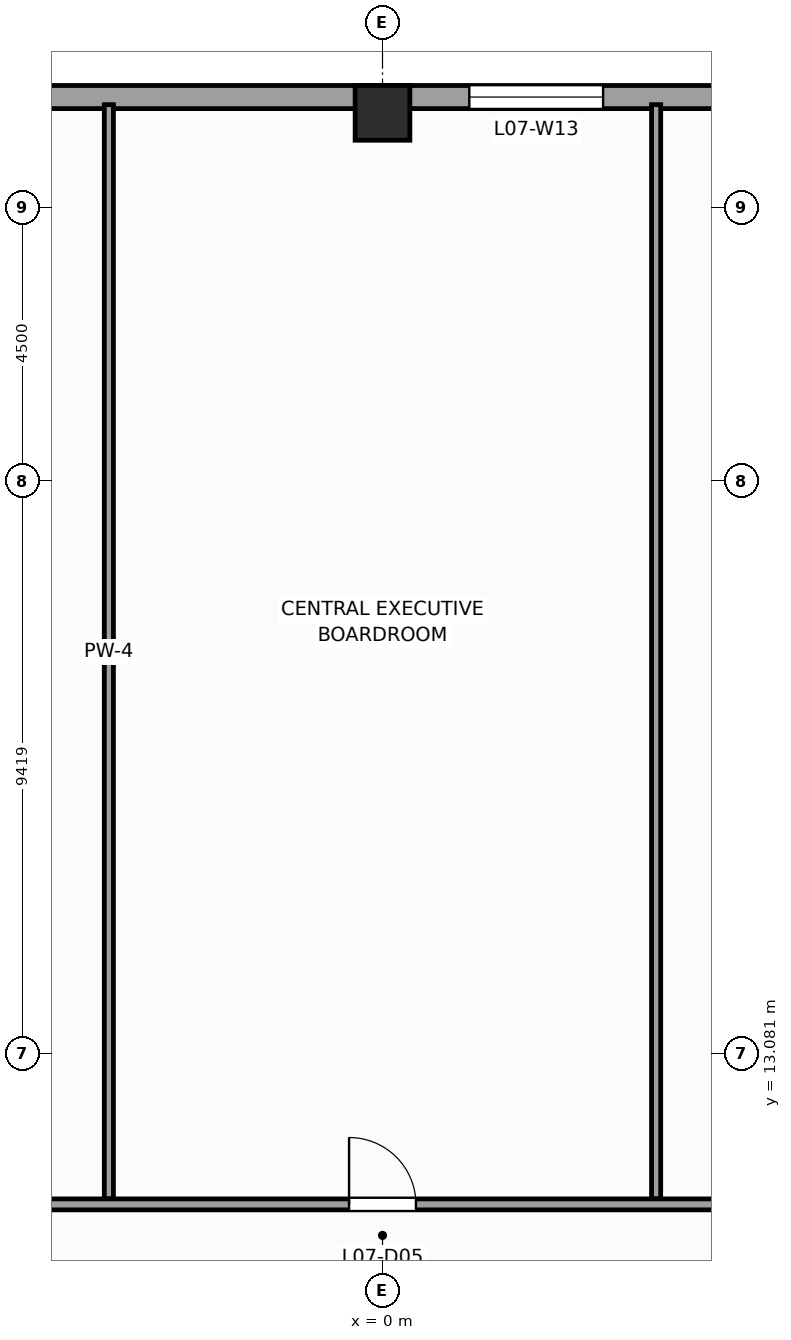
"""IFC4 building model, lengths in metres.
Left out: names, types, materials, properties, quantities, classifications, styles, units other than length and angle.
Written with IfcOpenShell. Run it as: python <this file> out.ifc"""

import sys

from ifc_helpers import new_model, si_unit, direction, frame, frame_2d, origin, origin_2d, place, context, subcontext, project, spatial, rectangle, extrude, source, transform, mapped, element, fill, save


model = new_model("IFC4")
c1 = context("Model", 3, precision=1e-05, world=origin(), true_north=direction((0.0, 1.0)))
c2 = subcontext(c1, "Body", "Model", "MODEL_VIEW")
j1 = project(units=[si_unit("LENGTHUNIT", "METRE"), si_unit("PLANEANGLEUNIT", "RADIAN")], contexts=[c1])
p1 = place(None, origin())
s1 = spatial("IfcSite", under=j1, at=p1, CompositionType="ELEMENT")
p2 = place(p1, origin())
s2 = spatial("IfcBuilding", under=s1, at=p2, CompositionType="ELEMENT")
p3 = place(p2, frame((0.0, 0.0, 34.0)))
s3 = spatial("IfcBuildingStorey", under=s2, at=p3, CompositionType="ELEMENT", Elevation=34.0)
m1 = source(origin(), c2, "Body", "SweptSolid", [
    extrude(rectangle(XDim=0.9, YDim=0.9, at=origin_2d()), origin(), (0.0, 0.0, 1.0), 4.0),
])
p4 = place(p3, frame((0.0, 28.55, 0.0), z_axis=(0.0, 0.0, 1.0), x_axis=(1.0, 0.0, 0.0)))
e1 = element("IfcColumn", 1, at=p4, inside=s3, PredefinedType="COLUMN", context=c2, shape_type="MappedRepresentation", body=[
    mapped(m1, transform((0.0, 0.0, 0.0), scale=1.0)),
])
p5 = place(p3, frame((25.69, 28.81, 0.0), z_axis=(0.0, 0.0, 1.0), x_axis=(-1.0, 0.0, 0.0)))
e2 = element("IfcWall", 2, at=p5, inside=s3, PredefinedType="STANDARD", context=c2, shape_type="SweptSolid", body=[
    extrude(rectangle(XDim=51.38, YDim=0.38, at=frame_2d((25.69, 0.0))), origin(), (0.0, 0.0, 1.0), 3.12),
])
p6 = place(p5, frame((5.466, 0.0, 0.49)))
e3 = element("IfcOpeningElement", 3, at=p6, cuts=e2, PredefinedType="OPENING", context=c2, shape_type="SweptSolid", body=[
    extrude(rectangle(XDim=1.4, YDim=2.4, at=frame_2d((0.7, 1.2))), frame((0.0, 0.2, 0.0), z_axis=(0.0, -1.0, 0.0), x_axis=(1.0, 0.0, 0.0)), (0.0, 0.0, 1.0), 0.4),
])
p7 = place(p5, frame((13.8, 0.0, 0.49)))
e4 = element("IfcOpeningElement", 4, at=p7, cuts=e2, PredefinedType="OPENING", context=c2, shape_type="SweptSolid", body=[
    extrude(rectangle(XDim=2.2, YDim=2.4, at=frame_2d((1.1, 1.2))), frame((0.0, 0.2, 0.0), z_axis=(0.0, -1.0, 0.0), x_axis=(1.0, 0.0, 0.0)), (0.0, 0.0, 1.0), 0.4),
])
p8 = place(p5, frame((22.062, 0.0, 0.49)))
e5 = element("IfcOpeningElement", 5, at=p8, cuts=e2, PredefinedType="OPENING", context=c2, shape_type="SweptSolid", body=[
    extrude(rectangle(XDim=2.2, YDim=2.4, at=frame_2d((1.1, 1.2))), frame((0.0, 0.2, 0.0), z_axis=(0.0, -1.0, 0.0), x_axis=(1.0, 0.0, 0.0)), (0.0, 0.0, 1.0), 0.4),
])
p9 = place(p5, frame((33.838, 0.0, 0.49)))
e6 = element("IfcOpeningElement", 6, at=p9, cuts=e2, PredefinedType="OPENING", context=c2, shape_type="SweptSolid", body=[
    extrude(rectangle(XDim=2.2, YDim=2.4, at=frame_2d((1.1, 1.2))), frame((0.0, 0.2, 0.0), z_axis=(0.0, -1.0, 0.0), x_axis=(1.0, 0.0, 0.0)), (0.0, 0.0, 1.0), 0.4),
])
p10 = place(p5, frame((43.487, 0.0, 0.49)))
e7 = element("IfcOpeningElement", 7, at=p10, cuts=e2, PredefinedType="OPENING", context=c2, shape_type="SweptSolid", body=[
    extrude(rectangle(XDim=1.4, YDim=2.4, at=frame_2d((0.7, 1.2))), frame((0.0, 0.2, 0.0), z_axis=(0.0, -1.0, 0.0), x_axis=(1.0, 0.0, 0.0)), (0.0, 0.0, 1.0), 0.4),
])
p11 = place(p3, frame((-10.6, 10.6, 0.0), z_axis=(0.0, 0.0, 1.0), x_axis=(1.0, 0.0, 0.0)))
e8 = element("IfcWall", 8, at=p11, inside=s3, PredefinedType="PARTITIONING", context=c2, shape_type="SweptSolid", body=[
    extrude(rectangle(XDim=21.2, YDim=0.18, at=frame_2d((10.6, 0.0))), origin(), (0.0, 0.0, 1.0), 3.72),
])
p12 = place(p11, frame((10.05, 0.0, 0.0)))
e9 = element("IfcOpeningElement", 9, at=p12, cuts=e8, PredefinedType="OPENING", context=c2, shape_type="SweptSolid", body=[
    extrude(rectangle(XDim=1.1, YDim=2.2, at=frame_2d((0.55, 1.1))), frame((0.0, 0.1, 0.0), z_axis=(0.0, -1.0, 0.0), x_axis=(1.0, 0.0, 0.0)), (0.0, 0.0, 1.0), 0.2),
])
for number, where, z_axis, x_axis in (
    (10, (-4.5, 10.695, 0.0), (0.0, 0.0, 1.0), (0.0, 1.0, 0.0)),
    (11, (4.5, 10.695, 0.0), (0.0, 0.0, 1.0), (0.0, 1.0, 0.0)),
):
    element("IfcWall", number, at=place(p3, frame(where, z_axis=z_axis, x_axis=x_axis)), inside=s3, PredefinedType="PARTITIONING", context=c2, shape_type="SweptSolid", body=[
        extrude(rectangle(XDim=17.99, YDim=0.15, at=frame_2d((8.995, 0.0))), origin(), (0.0, 0.0, 1.0), 3.72),
    ])
m2 = source(origin(), c2, "Body", "SweptSolid", [
    extrude(rectangle(XDim=2.2, YDim=2.4, at=frame_2d((1.1, 1.2))), frame((0.0, 0.03, 0.0), z_axis=(0.0, -1.0, 0.0), x_axis=(1.0, 0.0, 0.0)), (0.0, 0.0, 1.0), 0.06),
])
p13 = place(p8, origin())
e12 = element("IfcWindow", 12, at=p13, inside=s3, PartitioningType="SINGLE_PANEL", PredefinedType="WINDOW", context=c2, shape_type="MappedRepresentation", body=[
    mapped(m2, transform((0.0, 0.0, 0.0), scale=1.0)),
])
fill(e5, e12)
m3 = source(origin(), c2, "Body", "SweptSolid", [
    extrude(rectangle(XDim=1.1, YDim=2.2, at=frame_2d((0.55, 1.1))), frame((0.0, 0.025, 0.0), z_axis=(0.0, -1.0, 0.0), x_axis=(1.0, 0.0, 0.0)), (0.0, 0.0, 1.0), 0.05),
])
p14 = place(p12, origin())
e13 = element("IfcDoor", 13, at=p14, inside=s3, OperationType="SINGLE_SWING_LEFT", PredefinedType="DOOR", context=c2, shape_type="MappedRepresentation", body=[
    mapped(m3, transform((0.0, 0.0, 0.0), scale=1.0)),
])
fill(e9, e13)
save(model, sys.argv[1])
